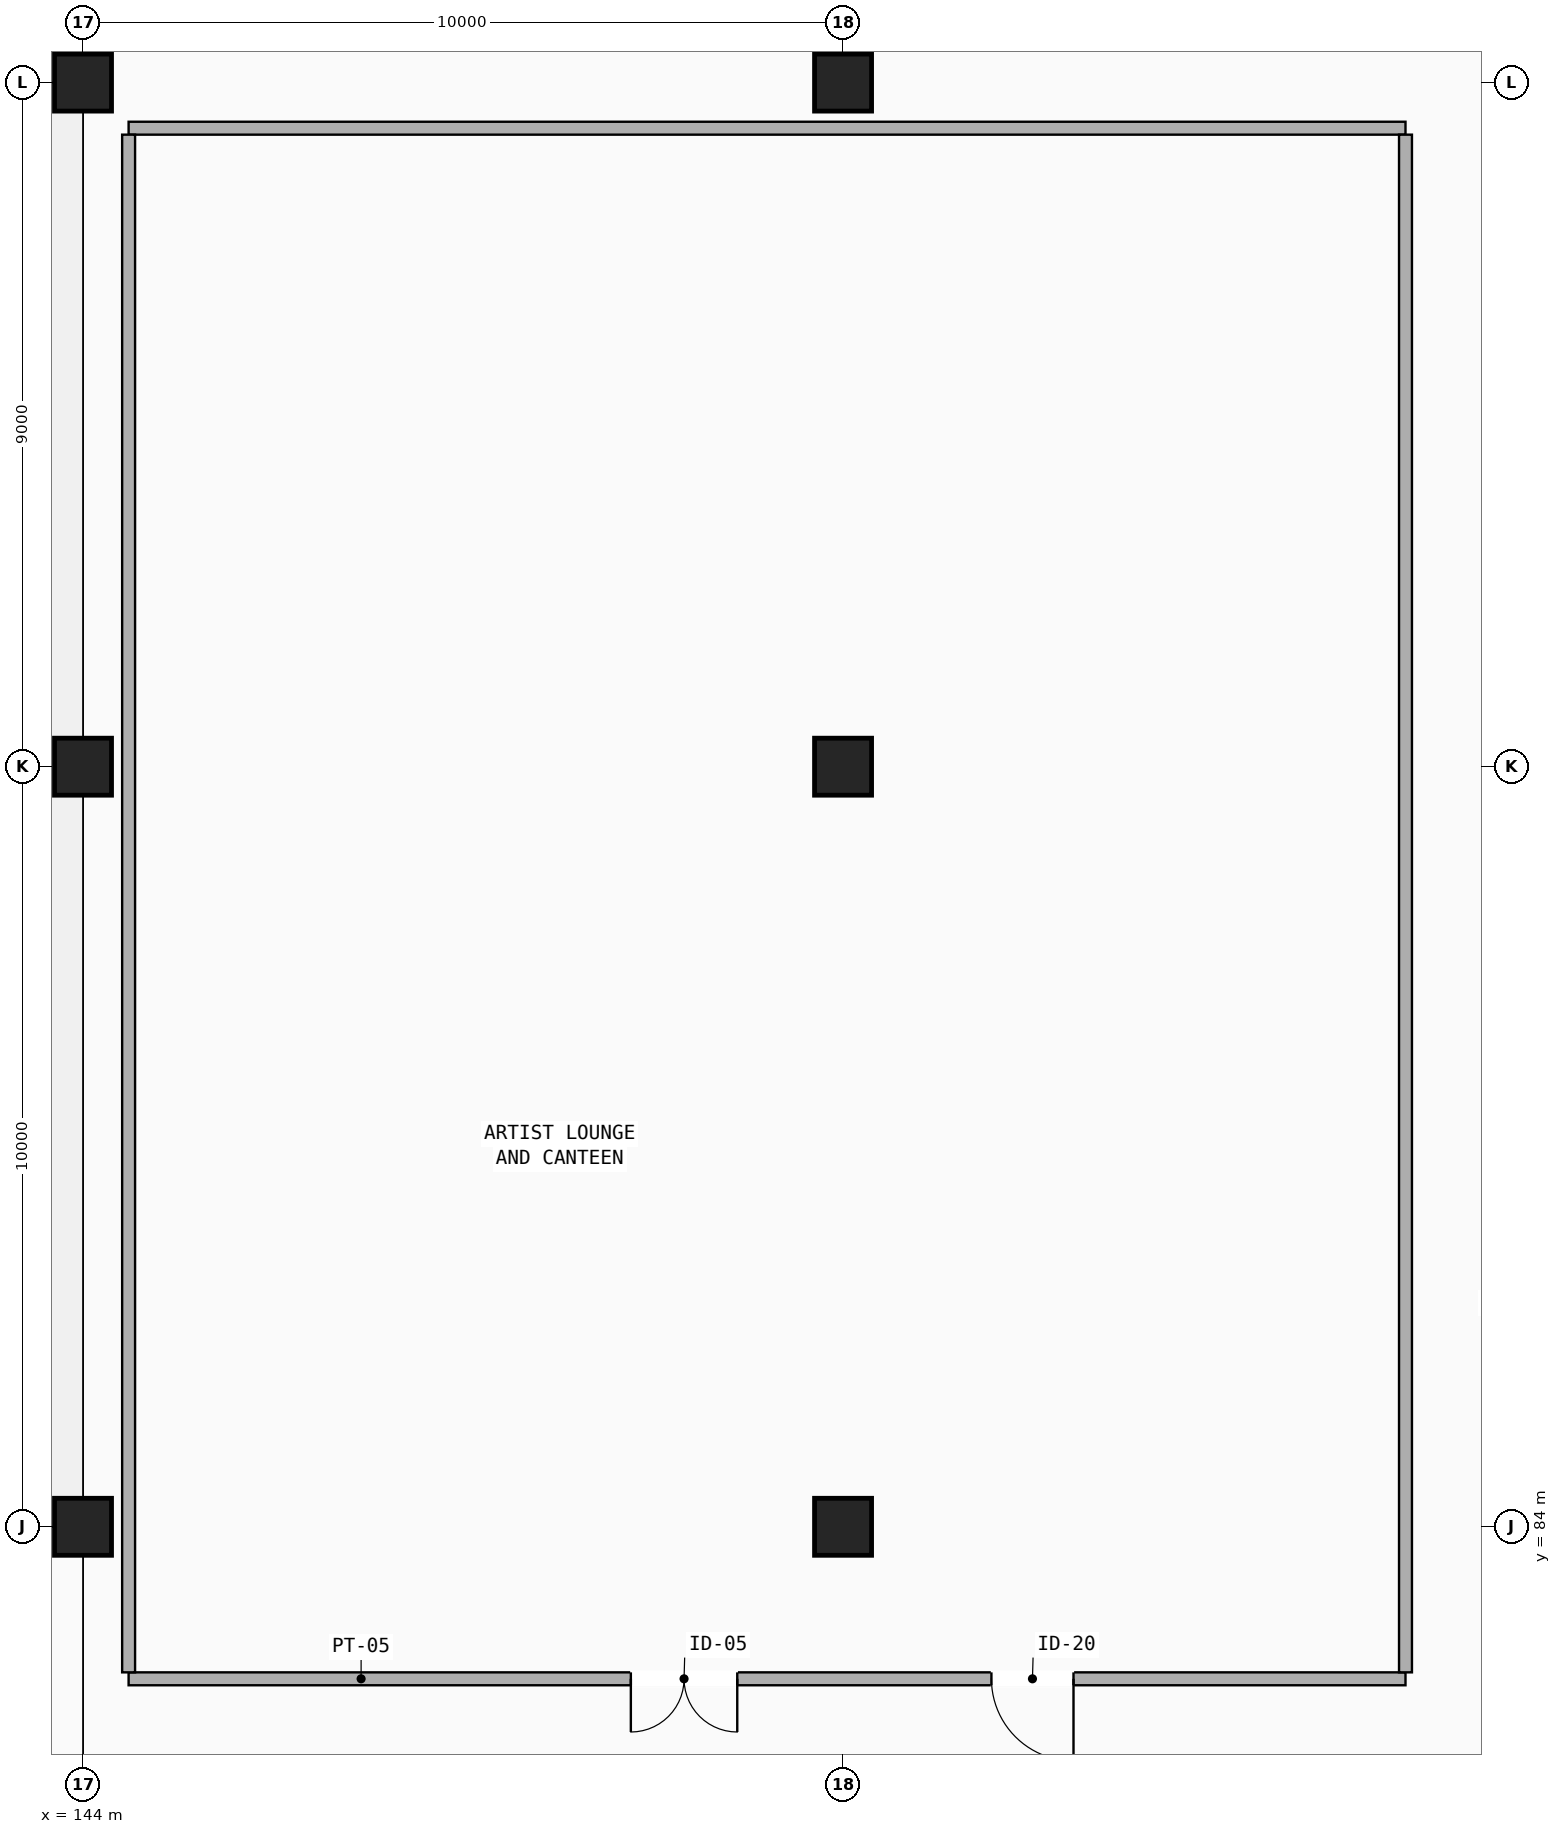
"""IFC4 building model, lengths in metres.
Left out: names, types, materials, properties, quantities, classifications, styles, units other than length and angle.
Written with IfcOpenShell. Run it as: python <this file> out.ifc"""

import sys

from ifc_helpers import new_model, si_unit, direction, frame, frame_2d, origin, origin_2d, place, context, subcontext, project, spatial, rectangle, extrude, element, fill, save


model = new_model("IFC4")
c1 = context("Model", 3, precision=1e-05, world=origin(), true_north=direction((0.0, 1.0)))
c2 = subcontext(c1, "Body", "Model", "MODEL_VIEW")
j1 = project(units=[si_unit("LENGTHUNIT", "METRE"), si_unit("PLANEANGLEUNIT", "RADIAN")], contexts=[c1])
p1 = place(None, origin())
s1 = spatial("IfcSite", under=j1, at=p1, CompositionType="ELEMENT")
p2 = place(p1, origin())
s2 = spatial("IfcBuilding", under=s1, at=p2, CompositionType="ELEMENT")
p3 = place(p2, origin())
s3 = spatial("IfcBuildingStorey", under=s2, at=p3, CompositionType="ELEMENT", Elevation=0.0)
for number, where, z_axis, x_axis in (
    (1, (144.0, 84.0, 0.0), (0.0, 0.0, 1.0), (1.0, 0.0, 0.0)),
    (2, (144.0, 94.0, 0.0), (0.0, 0.0, 1.0), (1.0, 0.0, 0.0)),
    (3, (144.0, 103.0, 0.0), (0.0, 0.0, 1.0), (1.0, 0.0, 0.0)),
    (4, (154.0, 84.0, 0.0), (0.0, 0.0, 1.0), (1.0, 0.0, 0.0)),
    (5, (154.0, 94.0, 0.0), (0.0, 0.0, 1.0), (1.0, 0.0, 0.0)),
    (6, (154.0, 103.0, 0.0), (0.0, 0.0, 1.0), (1.0, 0.0, 0.0)),
):
    element("IfcColumn", number, at=place(p3, frame(where, z_axis=z_axis, x_axis=x_axis)), inside=s3, PredefinedType="COLUMN", context=c2, shape_type="SweptSolid", body=[
        extrude(rectangle(XDim=0.75, YDim=0.75, at=origin_2d()), origin(), (0.0, 0.0, 1.0), 5.1),
    ])
p4 = place(p3, frame((144.6, 82.0, 0.0), z_axis=(0.0, 0.0, 1.0), x_axis=(1.0, 0.0, 0.0)))
e7 = element("IfcWall", 7, at=p4, inside=s3, PredefinedType="PARTITIONING", context=c2, shape_type="SweptSolid", body=[
    extrude(rectangle(XDim=16.8, YDim=0.17, at=frame_2d((8.4, 0.0))), origin(), (0.0, 0.0, 1.0), 4.15),
])
p5 = place(p4, frame((6.608, 0.0, 0.0)))
e8 = element("IfcOpeningElement", 8, at=p5, cuts=e7, PredefinedType="OPENING", context=c2, shape_type="SweptSolid", body=[
    extrude(rectangle(XDim=1.4, YDim=2.2, at=frame_2d((0.7, 1.1))), frame((0.0, 0.095, 0.0), z_axis=(0.0, -1.0, 0.0), x_axis=(1.0, 0.0, 0.0)), (0.0, 0.0, 1.0), 0.19),
])
p6 = place(p4, frame((11.352, 0.0, 0.0)))
e9 = element("IfcOpeningElement", 9, at=p6, cuts=e7, PredefinedType="OPENING", context=c2, shape_type="SweptSolid", body=[
    extrude(rectangle(XDim=1.08, YDim=2.14, at=frame_2d((0.54, 1.07))), frame((0.0, 0.095, 0.0), z_axis=(0.0, -1.0, 0.0), x_axis=(1.0, 0.0, 0.0)), (0.0, 0.0, 1.0), 0.19),
])
p7 = place(p3, frame((144.6, 102.4, 0.0), z_axis=(0.0, 0.0, 1.0), x_axis=(1.0, 0.0, 0.0)))
e10 = element("IfcWall", 10, at=p7, inside=s3, PredefinedType="PARTITIONING", context=c2, shape_type="SweptSolid", body=[
    extrude(rectangle(XDim=16.8, YDim=0.17, at=frame_2d((8.4, 0.0))), origin(), (0.0, 0.0, 1.0), 3.98),
])
for number, where, z_axis, x_axis in (
    (11, (144.6, 82.085, 0.0), (0.0, 0.0, 1.0), (0.0, 1.0, 0.0)),
    (12, (161.4, 82.085, 0.0), (0.0, 0.0, 1.0), (0.0, 1.0, 0.0)),
):
    element("IfcWall", number, at=place(p3, frame(where, z_axis=z_axis, x_axis=x_axis)), inside=s3, PredefinedType="PARTITIONING", context=c2, shape_type="SweptSolid", body=[
        extrude(rectangle(XDim=20.23, YDim=0.17, at=frame_2d((10.115, 0.0))), origin(), (0.0, 0.0, 1.0), 3.83),
    ])
p8 = place(p5, frame((1.4, 0.0, 0.0), z_axis=(0.0, 0.0, 1.0), x_axis=(-1.0, 0.0, 0.0)))
e13 = element("IfcDoor", 13, at=p8, inside=s3, OperationType="DOUBLE_DOOR_SINGLE_SWING", PredefinedType="DOOR", context=c2, shape_type="SweptSolid", body=[
    extrude(rectangle(XDim=1.4, YDim=2.2, at=frame_2d((0.7, 1.1))), frame((0.0, 0.025, 0.0), z_axis=(0.0, -1.0, 0.0), x_axis=(1.0, 0.0, 0.0)), (0.0, 0.0, 1.0), 0.05),
])
fill(e8, e13)
p9 = place(p6, frame((1.08, 0.0, 0.0), z_axis=(0.0, 0.0, 1.0), x_axis=(-1.0, 0.0, 0.0)))
e14 = element("IfcDoor", 14, at=p9, inside=s3, OperationType="SINGLE_SWING_LEFT", PredefinedType="DOOR", context=c2, shape_type="SweptSolid", body=[
    extrude(rectangle(XDim=1.08, YDim=2.14, at=frame_2d((0.54, 1.07))), frame((0.0, 0.025, 0.0), z_axis=(0.0, -1.0, 0.0), x_axis=(1.0, 0.0, 0.0)), (0.0, 0.0, 1.0), 0.05),
])
fill(e9, e14)
save(model, sys.argv[1])
